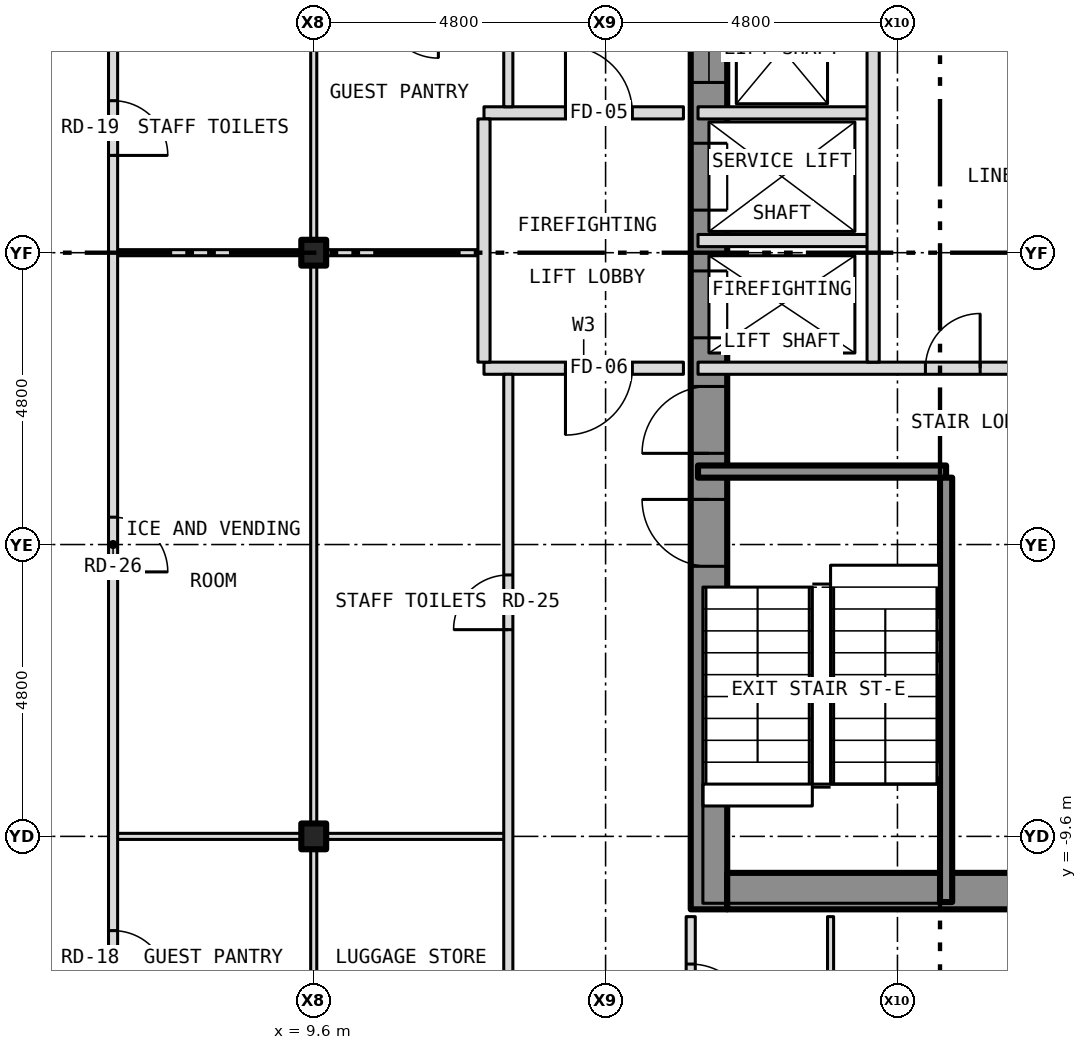
"""IFC4 building model, lengths in metres.
Left out: names, types, materials, properties, quantities, classifications, styles, units other than length and angle.
Written with IfcOpenShell. Run it as: python <this file> out.ifc"""

import sys

from ifc_helpers import new_model, si_unit, direction, frame, frame_2d, origin, origin_2d, place, context, subcontext, project, spatial, rectangle, i_section, extrude, element, fill, save


model = new_model("IFC4")
c1 = context("Model", 3, precision=1e-05, world=origin(), true_north=direction((0.0, 1.0)))
c2 = subcontext(c1, "Body", "Model", "MODEL_VIEW")
j1 = project(units=[si_unit("LENGTHUNIT", "METRE"), si_unit("PLANEANGLEUNIT", "RADIAN")], contexts=[c1])
p1 = place(None, origin())
s1 = spatial("IfcSite", under=j1, at=p1, CompositionType="ELEMENT")
p2 = place(p1, origin())
s2 = spatial("IfcBuilding", under=s1, at=p2, CompositionType="ELEMENT")
p3 = place(p2, frame((0.0, 0.0, 53.0)))
s3 = spatial("IfcBuildingStorey", under=s2, at=p3, CompositionType="ELEMENT", Elevation=53.0)
for number, where, z_axis, x_axis in (
    (1, (9.6, -9.6, -0.15), (0.0, 0.0, 1.0), (1.0, 0.0, 0.0)),
    (2, (9.6, 0.0, -0.15), (0.0, 0.0, 1.0), (1.0, 0.0, 0.0)),
):
    element("IfcColumn", number, at=place(p3, frame(where, z_axis=z_axis, x_axis=x_axis)), inside=s3, PredefinedType="COLUMN", context=c2, shape_type="SweptSolid", body=[
        extrude(i_section(OverallWidth=0.409, OverallDepth=0.424, WebThickness=0.033, FlangeThickness=0.052, at=origin_2d()), origin(), (0.0, 0.0, 1.0), 3.5),
    ])
p4 = place(p3, frame((16.1, -10.8, 0.0), z_axis=(0.0, 0.0, 1.0), x_axis=(0.0, 1.0, 0.0)))
e3 = element("IfcWall", 3, at=p4, inside=s3, PredefinedType="SHEAR", context=c2, shape_type="SweptSolid", body=[
    extrude(rectangle(XDim=21.6, YDim=0.6, at=frame_2d((10.8, 0.0))), origin(), (0.0, 0.0, 1.0), 3.25),
])
p5 = place(p4, frame((9.4, 0.0, 0.0)))
e4 = element("IfcOpeningElement", 4, at=p5, cuts=e3, PredefinedType="OPENING", context=c2, shape_type="SweptSolid", body=[
    extrude(rectangle(XDim=1.1, YDim=2.1, at=frame_2d((0.55, 1.05))), frame((0.0, 0.312, 0.0), z_axis=(0.0, -1.0, 0.0), x_axis=(1.0, 0.0, 0.0)), (0.0, 0.0, 1.0), 0.624),
])
p6 = place(p4, frame((11.5, 0.0, 0.0)))
e5 = element("IfcOpeningElement", 5, at=p6, cuts=e3, PredefinedType="OPENING", context=c2, shape_type="SweptSolid", body=[
    extrude(rectangle(XDim=1.1, YDim=2.1, at=frame_2d((0.55, 1.05))), frame((0.0, 0.312, 0.0), z_axis=(0.0, -1.0, 0.0), x_axis=(1.0, 0.0, 0.0)), (0.0, 0.0, 1.0), 0.624),
])
p7 = place(p4, frame((13.6, 0.0, 0.0)))
e6 = element("IfcOpeningElement", 6, at=p7, cuts=e3, PredefinedType="OPENING", context=c2, shape_type="SweptSolid", body=[
    extrude(rectangle(XDim=1.1, YDim=2.1, at=frame_2d((0.55, 1.05))), frame((0.0, 0.312, 0.0), z_axis=(0.0, -1.0, 0.0), x_axis=(1.0, 0.0, 0.0)), (0.0, 0.0, 1.0), 0.624),
])
p8 = place(p4, frame((15.7, 0.0, 0.0)))
e7 = element("IfcOpeningElement", 7, at=p8, cuts=e3, PredefinedType="OPENING", context=c2, shape_type="SweptSolid", body=[
    extrude(rectangle(XDim=1.1, YDim=2.1, at=frame_2d((0.55, 1.05))), frame((0.0, 0.312, 0.0), z_axis=(0.0, -1.0, 0.0), x_axis=(1.0, 0.0, 0.0)), (0.0, 0.0, 1.0), 0.624),
])
p9 = place(p4, frame((17.8, 0.0, 0.0)))
e8 = element("IfcOpeningElement", 8, at=p9, cuts=e3, PredefinedType="OPENING", context=c2, shape_type="SweptSolid", body=[
    extrude(rectangle(XDim=1.1, YDim=2.1, at=frame_2d((0.55, 1.05))), frame((0.0, 0.312, 0.0), z_axis=(0.0, -1.0, 0.0), x_axis=(1.0, 0.0, 0.0)), (0.0, 0.0, 1.0), 0.624),
])
p10 = place(p4, frame((5.642, 0.0, 0.0)))
e9 = element("IfcOpeningElement", 9, at=p10, cuts=e3, PredefinedType="OPENING", context=c2, shape_type="SweptSolid", body=[
    extrude(rectangle(XDim=1.1, YDim=2.1, at=frame_2d((0.55, 1.05))), frame((0.0, 0.312, 0.0), z_axis=(0.0, -1.0, 0.0), x_axis=(1.0, 0.0, 0.0)), (0.0, 0.0, 1.0), 0.624),
])
p11 = place(p4, frame((7.5, 0.0, 0.0)))
e10 = element("IfcOpeningElement", 10, at=p11, cuts=e3, PredefinedType="OPENING", context=c2, shape_type="SweptSolid", body=[
    extrude(rectangle(XDim=1.1, YDim=2.1, at=frame_2d((0.55, 1.05))), frame((0.0, 0.312, 0.0), z_axis=(0.0, -1.0, 0.0), x_axis=(1.0, 0.0, 0.0)), (0.0, 0.0, 1.0), 0.624),
])
p12 = place(p3, frame((16.4, -10.5, 0.0), z_axis=(0.0, 0.0, 1.0), x_axis=(1.0, 0.0, 0.0)))
e11 = element("IfcWall", 11, at=p12, inside=s3, PredefinedType="SHEAR", context=c2, shape_type="SweptSolid", body=[
    extrude(rectangle(XDim=7.0, YDim=0.6, at=frame_2d((3.5, 0.0))), origin(), (0.0, 0.0, 1.0), 3.25),
])
p13 = place(p3, frame((6.3, -9.6, 0.0), z_axis=(0.0, 0.0, 1.0), x_axis=(1.0, 0.0, 0.0)))
e12 = element("IfcWall", 12, at=p13, inside=s3, PredefinedType="PARTITIONING", context=c2, shape_type="SweptSolid", body=[
    extrude(rectangle(XDim=3.096, YDim=0.1, at=frame_2d((1.548, 0.0))), origin(), (0.0, 0.0, 1.0), 2.728),
])
p14 = place(p3, frame((9.396, -9.6, 0.0), z_axis=(0.0, 0.0, 1.0), x_axis=(1.0, 0.0, 0.0)))
e13 = element("IfcWall", 13, at=p14, inside=s3, PredefinedType="PARTITIONING", context=c2, shape_type="SweptSolid", body=[
    extrude(rectangle(XDim=0.408, YDim=0.1, at=frame_2d((0.204, 0.0))), origin(), (0.0, 0.0, 1.0), 3.35),
])
p15 = place(p3, frame((9.804, -9.6, 0.0), z_axis=(0.0, 0.0, 1.0), x_axis=(1.0, 0.0, 0.0)))
e14 = element("IfcWall", 14, at=p15, inside=s3, PredefinedType="PARTITIONING", context=c2, shape_type="SweptSolid", body=[
    extrude(rectangle(XDim=2.996, YDim=0.1, at=frame_2d((1.498, 0.0))), origin(), (0.0, 0.0, 1.0), 2.728),
])
p16 = place(p3, frame((15.92, -3.6, 0.0), z_axis=(0.0, 0.0, 1.0), x_axis=(1.0, 0.0, 0.0)))
e15 = element("IfcWall", 15, at=p16, inside=s3, PredefinedType="SHEAR", context=c2, shape_type="SweptSolid", body=[
    extrude(rectangle(XDim=4.08, YDim=0.2, at=frame_2d((2.04, 0.0))), origin(), (0.0, 0.0, 1.0), 3.25),
])
p17 = place(p3, frame((12.4, -1.9, 0.0), z_axis=(0.0, 0.0, 1.0), x_axis=(1.0, 0.0, 0.0)))
e16 = element("IfcWall", 16, at=p17, inside=s3, PredefinedType="PARTITIONING", context=c2, shape_type="SweptSolid", body=[
    extrude(rectangle(XDim=3.28, YDim=0.2, at=frame_2d((1.64, 0.0))), origin(), (0.0, 0.0, 1.0), 3.35),
])
p18 = place(p17, frame((1.34, 0.0, 0.0)))
e17 = element("IfcOpeningElement", 17, at=p18, cuts=e16, PredefinedType="OPENING", context=c2, shape_type="SweptSolid", body=[
    extrude(rectangle(XDim=1.1, YDim=2.1, at=frame_2d((0.55, 1.05))), frame((0.0, 0.112, 0.0), z_axis=(0.0, -1.0, 0.0), x_axis=(1.0, 0.0, 0.0)), (0.0, 0.0, 1.0), 0.224),
])
p19 = place(p3, frame((15.92, -1.9, 0.0), z_axis=(0.0, 0.0, 1.0), x_axis=(1.0, 0.0, 0.0)))
e18 = element("IfcWall", 18, at=p19, inside=s3, PredefinedType="PARTITIONING", context=c2, shape_type="SweptSolid", body=[
    extrude(rectangle(XDim=7.96, YDim=0.2, at=frame_2d((3.98, 0.0))), origin(), (0.0, 0.0, 1.0), 3.25),
])
p20 = place(p19, frame((3.74, 0.0, 0.0)))
e19 = element("IfcOpeningElement", 19, at=p20, cuts=e18, PredefinedType="OPENING", context=c2, shape_type="SweptSolid", body=[
    extrude(rectangle(XDim=0.9, YDim=2.1, at=frame_2d((0.45, 1.05))), frame((0.0, 0.112, 0.0), z_axis=(0.0, -1.0, 0.0), x_axis=(1.0, 0.0, 0.0)), (0.0, 0.0, 1.0), 0.224),
])
p21 = place(p3, frame((6.3, 0.0, 0.0), z_axis=(0.0, 0.0, 1.0), x_axis=(1.0, 0.0, 0.0)))
e20 = element("IfcWall", 20, at=p21, inside=s3, PredefinedType="PARTITIONING", context=c2, shape_type="SweptSolid", body=[
    extrude(rectangle(XDim=3.096, YDim=0.1, at=frame_2d((1.548, 0.0))), origin(), (0.0, 0.0, 1.0), 2.728),
])
p22 = place(p3, frame((9.396, 0.0, 0.0), z_axis=(0.0, 0.0, 1.0), x_axis=(1.0, 0.0, 0.0)))
e21 = element("IfcWall", 21, at=p22, inside=s3, PredefinedType="PARTITIONING", context=c2, shape_type="SweptSolid", body=[
    extrude(rectangle(XDim=0.408, YDim=0.1, at=frame_2d((0.204, 0.0))), origin(), (0.0, 0.0, 1.0), 3.35),
])
p23 = place(p3, frame((9.804, 0.0, 0.0), z_axis=(0.0, 0.0, 1.0), x_axis=(1.0, 0.0, 0.0)))
e22 = element("IfcWall", 22, at=p23, inside=s3, PredefinedType="PARTITIONING", context=c2, shape_type="SweptSolid", body=[
    extrude(rectangle(XDim=2.596, YDim=0.1, at=frame_2d((1.298, 0.0))), origin(), (0.0, 0.0, 1.0), 2.728),
])
p24 = place(p3, frame((15.92, 0.2, 0.0), z_axis=(0.0, 0.0, 1.0), x_axis=(1.0, 0.0, 0.0)))
e23 = element("IfcWall", 23, at=p24, inside=s3, PredefinedType="PARTITIONING", context=c2, shape_type="SweptSolid", body=[
    extrude(rectangle(XDim=2.88, YDim=0.2, at=frame_2d((1.44, 0.0))), origin(), (0.0, 0.0, 1.0), 3.25),
])
p25 = place(p3, frame((12.4, 2.3, 0.0), z_axis=(0.0, 0.0, 1.0), x_axis=(1.0, 0.0, 0.0)))
e24 = element("IfcWall", 24, at=p25, inside=s3, PredefinedType="PARTITIONING", context=c2, shape_type="SweptSolid", body=[
    extrude(rectangle(XDim=3.28, YDim=0.2, at=frame_2d((1.64, 0.0))), origin(), (0.0, 0.0, 1.0), 3.35),
])
p26 = place(p25, frame((1.34, 0.0, 0.0)))
e25 = element("IfcOpeningElement", 25, at=p26, cuts=e24, PredefinedType="OPENING", context=c2, shape_type="SweptSolid", body=[
    extrude(rectangle(XDim=1.1, YDim=2.1, at=frame_2d((0.55, 1.05))), frame((0.0, 0.112, 0.0), z_axis=(0.0, -1.0, 0.0), x_axis=(1.0, 0.0, 0.0)), (0.0, 0.0, 1.0), 0.224),
])
p27 = place(p3, frame((15.92, 2.3, 0.0), z_axis=(0.0, 0.0, 1.0), x_axis=(1.0, 0.0, 0.0)))
e26 = element("IfcWall", 26, at=p27, inside=s3, PredefinedType="PARTITIONING", context=c2, shape_type="SweptSolid", body=[
    extrude(rectangle(XDim=2.88, YDim=0.2, at=frame_2d((1.44, 0.0))), origin(), (0.0, 0.0, 1.0), 3.25),
])
p28 = place(p3, frame((6.3, -13.525, 0.0), z_axis=(0.0, 0.0, 1.0), x_axis=(0.0, 1.0, 0.0)))
e27 = element("IfcWall", 27, at=p28, inside=s3, PredefinedType="PARTITIONING", context=c2, shape_type="SweptSolid", body=[
    extrude(rectangle(XDim=17.55, YDim=0.15, at=frame_2d((8.775, 0.0))), origin(), (0.0, 0.0, 1.0), 3.35),
])
p29 = place(p28, frame((1.475, 0.0, 0.0)))
e28 = element("IfcOpeningElement", 28, at=p29, cuts=e27, PredefinedType="OPENING", context=c2, shape_type="SweptSolid", body=[
    extrude(rectangle(XDim=0.9, YDim=2.1, at=frame_2d((0.45, 1.05))), frame((0.0, 0.087, 0.0), z_axis=(0.0, -1.0, 0.0), x_axis=(1.0, 0.0, 0.0)), (0.0, 0.0, 1.0), 0.174),
])
p30 = place(p28, frame((15.125, 0.0, 0.0)))
e29 = element("IfcOpeningElement", 29, at=p30, cuts=e27, PredefinedType="OPENING", context=c2, shape_type="SweptSolid", body=[
    extrude(rectangle(XDim=0.9, YDim=2.1, at=frame_2d((0.45, 1.05))), frame((0.0, 0.087, 0.0), z_axis=(0.0, -1.0, 0.0), x_axis=(1.0, 0.0, 0.0)), (0.0, 0.0, 1.0), 0.174),
])
p31 = place(p28, frame((8.275, 0.0, 0.0)))
e30 = element("IfcOpeningElement", 30, at=p31, cuts=e27, PredefinedType="OPENING", context=c2, shape_type="SweptSolid", body=[
    extrude(rectangle(XDim=0.9, YDim=2.1, at=frame_2d((0.45, 1.05))), frame((0.0, 0.087, 0.0), z_axis=(0.0, -1.0, 0.0), x_axis=(1.0, 0.0, 0.0)), (0.0, 0.0, 1.0), 0.174),
])
p32 = place(p3, frame((9.6, -13.525, 0.0), z_axis=(0.0, 0.0, 1.0), x_axis=(0.0, 1.0, 0.0)))
e31 = element("IfcWall", 31, at=p32, inside=s3, PredefinedType="PARTITIONING", context=c2, shape_type="SweptSolid", body=[
    extrude(rectangle(XDim=3.875, YDim=0.1, at=frame_2d((1.938, 0.0))), origin(), (0.0, 0.0, 1.0), 2.728),
])
p33 = place(p3, frame((9.6, -9.55, 0.0), z_axis=(0.0, 0.0, 1.0), x_axis=(0.0, 1.0, 0.0)))
e32 = element("IfcWall", 32, at=p33, inside=s3, PredefinedType="PARTITIONING", context=c2, shape_type="SweptSolid", body=[
    extrude(rectangle(XDim=9.5, YDim=0.1, at=frame_2d((4.75, 0.0))), origin(), (0.0, 0.0, 1.0), 2.728),
])
p34 = place(p3, frame((9.6, 0.05, 0.0), z_axis=(0.0, 0.0, 1.0), x_axis=(0.0, 1.0, 0.0)))
e33 = element("IfcWall", 33, at=p34, inside=s3, PredefinedType="PARTITIONING", context=c2, shape_type="SweptSolid", body=[
    extrude(rectangle(XDim=3.975, YDim=0.1, at=frame_2d((1.987, 0.0))), origin(), (0.0, 0.0, 1.0), 2.728),
])
p35 = place(p3, frame((12.4, -1.8, 0.0), z_axis=(0.0, 0.0, 1.0), x_axis=(0.0, 1.0, 0.0)))
e34 = element("IfcWall", 34, at=p35, inside=s3, PredefinedType="PARTITIONING", context=c2, shape_type="SweptSolid", body=[
    extrude(rectangle(XDim=4.0, YDim=0.2, at=frame_2d((2.0, 0.0))), origin(), (0.0, 0.0, 1.0), 3.35),
])
p36 = place(p3, frame((12.8, -13.525, 0.0), z_axis=(0.0, 0.0, 1.0), x_axis=(0.0, 1.0, 0.0)))
e35 = element("IfcWall", 35, at=p36, inside=s3, PredefinedType="PARTITIONING", context=c2, shape_type="SweptSolid", body=[
    extrude(rectangle(XDim=11.525, YDim=0.15, at=frame_2d((5.762, 0.0))), origin(), (0.0, 0.0, 1.0), 3.35),
])
p37 = place(p36, frame((7.325, 0.0, 0.0)))
e36 = element("IfcOpeningElement", 36, at=p37, cuts=e35, PredefinedType="OPENING", context=c2, shape_type="SweptSolid", body=[
    extrude(rectangle(XDim=0.9, YDim=2.1, at=frame_2d((0.45, 1.05))), frame((0.0, 0.087, 0.0), z_axis=(0.0, -1.0, 0.0), x_axis=(1.0, 0.0, 0.0)), (0.0, 0.0, 1.0), 0.174),
])
p38 = place(p3, frame((12.8, 2.4, 0.0), z_axis=(0.0, 0.0, 1.0), x_axis=(0.0, 1.0, 0.0)))
e37 = element("IfcWall", 37, at=p38, inside=s3, PredefinedType="PARTITIONING", context=c2, shape_type="SweptSolid", body=[
    extrude(rectangle(XDim=1.65, YDim=0.15, at=frame_2d((0.825, 0.0))), origin(), (0.0, 0.0, 1.0), 3.35),
])
p39 = place(p3, frame((15.8, -15.725, 0.0), z_axis=(0.0, 0.0, 1.0), x_axis=(0.0, 1.0, 0.0)))
e38 = element("IfcWall", 38, at=p39, inside=s3, PredefinedType="PARTITIONING", context=c2, shape_type="SweptSolid", body=[
    extrude(rectangle(XDim=4.805, YDim=0.15, at=frame_2d((2.403, 0.0))), origin(), (0.0, 0.0, 1.0), 3.35),
])
p40 = place(p39, frame((3.025, 0.0, 0.0)))
e39 = element("IfcOpeningElement", 39, at=p40, cuts=e38, PredefinedType="OPENING", context=c2, shape_type="SweptSolid", body=[
    extrude(rectangle(XDim=1.0, YDim=2.1, at=frame_2d((0.5, 1.05))), frame((0.0, 0.087, 0.0), z_axis=(0.0, -1.0, 0.0), x_axis=(1.0, 0.0, 0.0)), (0.0, 0.0, 1.0), 0.174),
])
p41 = place(p3, frame((18.1, -24.53, 0.0), z_axis=(0.0, 0.0, 1.0), x_axis=(0.0, 1.0, 0.0)))
e40 = element("IfcWall", 40, at=p41, inside=s3, PredefinedType="PARTITIONING", context=c2, shape_type="SweptSolid", body=[
    extrude(rectangle(XDim=13.61, YDim=0.1, at=frame_2d((6.805, 0.0))), origin(), (0.0, 0.0, 1.0), 3.35),
])
p42 = place(p41, frame((6.68, 0.0, 0.0)))
e41 = element("IfcOpeningElement", 41, at=p42, cuts=e40, PredefinedType="OPENING", context=c2, shape_type="SweptSolid", body=[
    extrude(rectangle(XDim=0.9, YDim=2.1, at=frame_2d((0.45, 1.05))), frame((0.0, 0.062, 0.0), z_axis=(0.0, -1.0, 0.0), x_axis=(1.0, 0.0, 0.0)), (0.0, 0.0, 1.0), 0.124),
])
p43 = place(p3, frame((18.8, -1.8, 0.0), z_axis=(0.0, 0.0, 1.0), x_axis=(0.0, 1.0, 0.0)))
e42 = element("IfcWall", 42, at=p43, inside=s3, PredefinedType="PARTITIONING", context=c2, shape_type="SweptSolid", body=[
    extrude(rectangle(XDim=6.15, YDim=0.2, at=frame_2d((3.075, 0.0))), origin(), (0.0, 0.0, 1.0), 3.25),
])
p44 = place(p3, frame((20.0, -10.68, 0.0), z_axis=(0.0, 0.0, 1.0), x_axis=(0.0, 1.0, 0.0)))
e43 = element("IfcWall", 43, at=p44, inside=s3, PredefinedType="SHEAR", context=c2, shape_type="SweptSolid", body=[
    extrude(rectangle(XDim=6.98, YDim=0.2, at=frame_2d((3.49, 0.0))), origin(), (0.0, 0.0, 1.0), 3.25),
])
p45 = place(p5, origin())
e44 = element("IfcDoor", 44, at=p45, inside=s3, OperationType="SLIDING_TO_LEFT", PredefinedType="DOOR", context=c2, shape_type="SweptSolid", body=[
    extrude(rectangle(XDim=1.1, YDim=2.1, at=frame_2d((0.55, 1.05))), frame((0.0, 0.025, 0.0), z_axis=(0.0, -1.0, 0.0), x_axis=(1.0, 0.0, 0.0)), (0.0, 0.0, 1.0), 0.05),
])
fill(e4, e44)
p46 = place(p6, origin())
e45 = element("IfcDoor", 45, at=p46, inside=s3, OperationType="SLIDING_TO_LEFT", PredefinedType="DOOR", context=c2, shape_type="SweptSolid", body=[
    extrude(rectangle(XDim=1.1, YDim=2.1, at=frame_2d((0.55, 1.05))), frame((0.0, 0.025, 0.0), z_axis=(0.0, -1.0, 0.0), x_axis=(1.0, 0.0, 0.0)), (0.0, 0.0, 1.0), 0.05),
])
fill(e5, e45)
p47 = place(p7, origin())
e46 = element("IfcDoor", 46, at=p47, inside=s3, OperationType="SLIDING_TO_LEFT", PredefinedType="DOOR", context=c2, shape_type="SweptSolid", body=[
    extrude(rectangle(XDim=1.1, YDim=2.1, at=frame_2d((0.55, 1.05))), frame((0.0, 0.025, 0.0), z_axis=(0.0, -1.0, 0.0), x_axis=(1.0, 0.0, 0.0)), (0.0, 0.0, 1.0), 0.05),
])
fill(e6, e46)
p48 = place(p10, origin())
e47 = element("IfcDoor", 47, at=p48, inside=s3, OperationType="SINGLE_SWING_RIGHT", PredefinedType="DOOR", context=c2, shape_type="SweptSolid", body=[
    extrude(rectangle(XDim=1.1, YDim=2.1, at=frame_2d((0.55, 1.05))), frame((0.0, 0.025, 0.0), z_axis=(0.0, -1.0, 0.0), x_axis=(1.0, 0.0, 0.0)), (0.0, 0.0, 1.0), 0.05),
])
fill(e9, e47)
p49 = place(p11, origin())
e48 = element("IfcDoor", 48, at=p49, inside=s3, OperationType="SINGLE_SWING_LEFT", PredefinedType="DOOR", context=c2, shape_type="SweptSolid", body=[
    extrude(rectangle(XDim=1.1, YDim=2.1, at=frame_2d((0.55, 1.05))), frame((0.0, 0.025, 0.0), z_axis=(0.0, -1.0, 0.0), x_axis=(1.0, 0.0, 0.0)), (0.0, 0.0, 1.0), 0.05),
])
fill(e10, e48)
p50 = place(p20, origin())
e49 = element("IfcDoor", 49, at=p50, inside=s3, OperationType="SINGLE_SWING_RIGHT", PredefinedType="DOOR", context=c2, shape_type="SweptSolid", body=[
    extrude(rectangle(XDim=0.9, YDim=2.1, at=frame_2d((0.45, 1.05))), frame((0.0, 0.025, 0.0), z_axis=(0.0, -1.0, 0.0), x_axis=(1.0, 0.0, 0.0)), (0.0, 0.0, 1.0), 0.05),
])
fill(e19, e49)
p51 = place(p26, origin())
e50 = element("IfcDoor", 50, at=p51, inside=s3, OperationType="SINGLE_SWING_LEFT", PredefinedType="DOOR", context=c2, shape_type="SweptSolid", body=[
    extrude(rectangle(XDim=1.1, YDim=2.1, at=frame_2d((0.55, 1.05))), frame((0.0, 0.025, 0.0), z_axis=(0.0, -1.0, 0.0), x_axis=(1.0, 0.0, 0.0)), (0.0, 0.0, 1.0), 0.05),
])
fill(e25, e50)
p52 = place(p18, origin())
e51 = element("IfcDoor", 51, at=p52, inside=s3, OperationType="SINGLE_SWING_LEFT", PredefinedType="DOOR", context=c2, shape_type="SweptSolid", body=[
    extrude(rectangle(XDim=1.1, YDim=2.1, at=frame_2d((0.55, 1.05))), frame((0.0, 0.025, 0.0), z_axis=(0.0, -1.0, 0.0), x_axis=(1.0, 0.0, 0.0)), (0.0, 0.0, 1.0), 0.05),
])
fill(e17, e51)
p53 = place(p40, origin())
e52 = element("IfcDoor", 52, at=p53, inside=s3, OperationType="SINGLE_SWING_LEFT", PredefinedType="DOOR", context=c2, shape_type="SweptSolid", body=[
    extrude(rectangle(XDim=1.0, YDim=2.1, at=frame_2d((0.5, 1.05))), frame((0.0, 0.025, 0.0), z_axis=(0.0, -1.0, 0.0), x_axis=(1.0, 0.0, 0.0)), (0.0, 0.0, 1.0), 0.05),
])
fill(e39, e52)
p54 = place(p29, origin())
e53 = element("IfcDoor", 53, at=p54, inside=s3, OperationType="SINGLE_SWING_LEFT", PredefinedType="DOOR", context=c2, shape_type="SweptSolid", body=[
    extrude(rectangle(XDim=0.9, YDim=2.1, at=frame_2d((0.45, 1.05))), frame((0.0, 0.025, 0.0), z_axis=(0.0, -1.0, 0.0), x_axis=(1.0, 0.0, 0.0)), (0.0, 0.0, 1.0), 0.05),
])
fill(e28, e53)
p55 = place(p30, origin())
e54 = element("IfcDoor", 54, at=p55, inside=s3, OperationType="SINGLE_SWING_LEFT", PredefinedType="DOOR", context=c2, shape_type="SweptSolid", body=[
    extrude(rectangle(XDim=0.9, YDim=2.1, at=frame_2d((0.45, 1.05))), frame((0.0, 0.025, 0.0), z_axis=(0.0, -1.0, 0.0), x_axis=(1.0, 0.0, 0.0)), (0.0, 0.0, 1.0), 0.05),
])
fill(e29, e54)
p56 = place(p37, origin())
e55 = element("IfcDoor", 55, at=p56, inside=s3, OperationType="SINGLE_SWING_LEFT", PredefinedType="DOOR", context=c2, shape_type="SweptSolid", body=[
    extrude(rectangle(XDim=0.9, YDim=2.1, at=frame_2d((0.45, 1.05))), frame((0.0, 0.025, 0.0), z_axis=(0.0, -1.0, 0.0), x_axis=(1.0, 0.0, 0.0)), (0.0, 0.0, 1.0), 0.05),
])
fill(e36, e55)
p57 = place(p31, origin())
e56 = element("IfcDoor", 56, at=p57, inside=s3, OperationType="SINGLE_SWING_LEFT", PredefinedType="DOOR", context=c2, shape_type="SweptSolid", body=[
    extrude(rectangle(XDim=0.9, YDim=2.1, at=frame_2d((0.45, 1.05))), frame((0.0, 0.025, 0.0), z_axis=(0.0, -1.0, 0.0), x_axis=(1.0, 0.0, 0.0)), (0.0, 0.0, 1.0), 0.05),
])
fill(e30, e56)
save(model, sys.argv[1])
